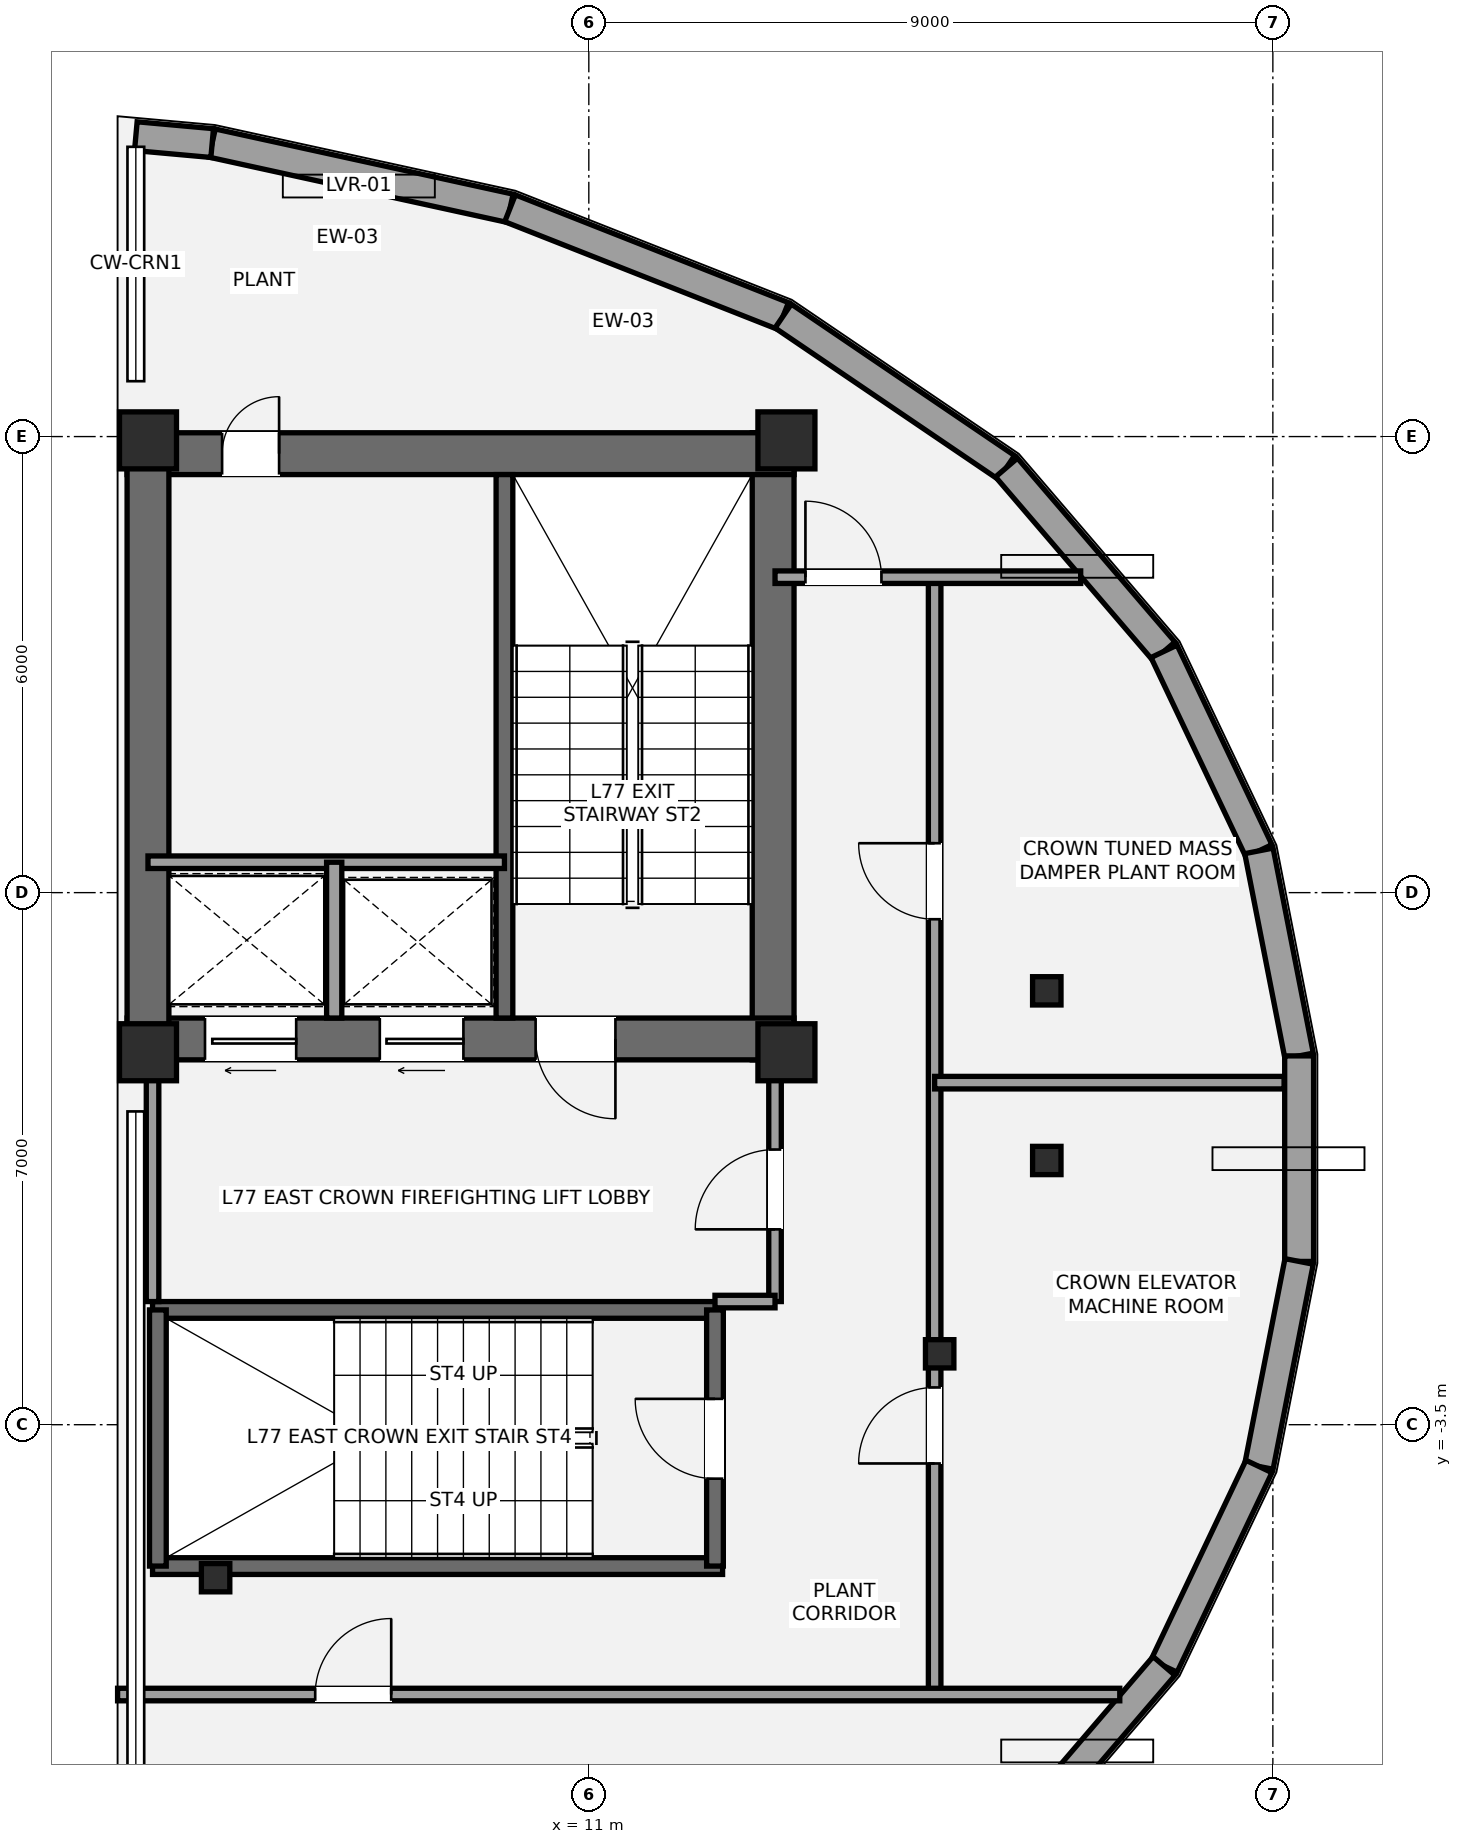
"""IFC4 building model, lengths in metres.
Left out: names, types, materials, properties, quantities, classifications, styles, units other than length and angle.
Written with IfcOpenShell. Run it as: python <this file> out.ifc"""

import sys

from ifc_helpers import new_model, si_unit, direction, frame, frame_2d, origin, origin_2d, place, context, subcontext, project, spatial, rectangle, i_section, extrude, element, fill, save


model = new_model("IFC4")
c1 = context("Model", 3, precision=1e-05, world=origin(), true_north=direction((0.0, 1.0)))
c2 = subcontext(c1, "Body", "Model", "MODEL_VIEW")
j1 = project(units=[si_unit("LENGTHUNIT", "METRE"), si_unit("PLANEANGLEUNIT", "RADIAN")], contexts=[c1])
p1 = place(None, origin())
s1 = spatial("IfcSite", under=j1, at=p1, CompositionType="ELEMENT")
p2 = place(p1, origin())
s2 = spatial("IfcBuilding", under=s1, at=p2, CompositionType="ELEMENT")
p3 = place(p2, frame((0.0, 0.0, 273.0)))
s3 = spatial("IfcBuildingStorey", under=s2, at=p3, CompositionType="ELEMENT", Elevation=273.0)
p4 = place(p3, frame((13.425, 1.3, 0.0), z_axis=(0.0, 0.0, 1.0), x_axis=(0.0, 1.0, 0.0)))
e1 = element("IfcWall", 1, at=p4, inside=s3, PredefinedType="SHEAR", context=c2, shape_type="SweptSolid", body=[
    extrude(rectangle(XDim=8.25, YDim=0.55, at=frame_2d((4.125, 0.0))), origin(), (0.0, 0.0, 1.0), 3.8),
])
p5 = place(p3, frame((4.925, 9.275, 0.0), z_axis=(0.0, 0.0, 1.0), x_axis=(1.0, 0.0, 0.0)))
e2 = element("IfcWall", 2, at=p5, inside=s3, PredefinedType="SHEAR", context=c2, shape_type="SweptSolid", body=[
    extrude(rectangle(XDim=8.775, YDim=0.55, at=frame_2d((4.387, 0.0))), origin(), (0.0, 0.0, 1.0), 3.8),
])
p6 = place(p5, frame((1.25, 0.0, 0.0)))
e3 = element("IfcOpeningElement", 3, at=p6, cuts=e2, PredefinedType="OPENING", context=c2, shape_type="SweptSolid", body=[
    extrude(rectangle(XDim=0.75, YDim=2.1, at=frame_2d((0.375, 1.05))), frame((0.0, 0.285, 0.0), z_axis=(0.0, -1.0, 0.0), x_axis=(1.0, 0.0, 0.0)), (0.0, 0.0, 1.0), 0.57),
])
p7 = place(p3, frame((13.7, 1.575, 0.0), z_axis=(0.0, 0.0, 1.0), x_axis=(-1.0, 0.0, 0.0)))
e4 = element("IfcWall", 4, at=p7, inside=s3, PredefinedType="SHEAR", context=c2, shape_type="SweptSolid", body=[
    extrude(rectangle(XDim=8.775, YDim=0.55, at=frame_2d((4.387, 0.0))), origin(), (0.0, 0.0, 1.0), 3.8),
])
p8 = place(p7, frame((2.35, 0.0, 0.0)))
e5 = element("IfcOpeningElement", 5, at=p8, cuts=e4, PredefinedType="OPENING", context=c2, shape_type="SweptSolid", body=[
    extrude(rectangle(XDim=1.05, YDim=2.15, at=frame_2d((0.525, 1.075))), frame((0.0, 0.285, 0.0), z_axis=(0.0, -1.0, 0.0), x_axis=(1.0, 0.0, 0.0)), (0.0, 0.0, 1.0), 0.57),
])
p9 = place(p7, frame((6.55, 0.0, 0.0)))
e6 = element("IfcOpeningElement", 6, at=p9, cuts=e4, PredefinedType="OPENING", context=c2, shape_type="SweptSolid", body=[
    extrude(rectangle(XDim=1.2, YDim=2.2, at=frame_2d((0.6, 1.1))), frame((0.0, 0.285, 0.0), z_axis=(0.0, -1.0, 0.0), x_axis=(1.0, 0.0, 0.0)), (0.0, 0.0, 1.0), 0.57),
])
p10 = place(p7, frame((4.35, 0.0, 0.0)))
e7 = element("IfcOpeningElement", 7, at=p10, cuts=e4, PredefinedType="OPENING", context=c2, shape_type="SweptSolid", body=[
    extrude(rectangle(XDim=1.1, YDim=2.2, at=frame_2d((0.55, 1.1))), frame((0.0, 0.285, 0.0), z_axis=(0.0, -1.0, 0.0), x_axis=(1.0, 0.0, 0.0)), (0.0, 0.0, 1.0), 0.57),
])
p11 = place(p3, frame((5.2, 1.3, 0.0), z_axis=(0.0, 0.0, 1.0), x_axis=(0.0, 1.0, 0.0)))
e8 = element("IfcWall", 8, at=p11, inside=s3, PredefinedType="SHEAR", context=c2, shape_type="SweptSolid", body=[
    extrude(rectangle(XDim=8.25, YDim=0.55, at=frame_2d((4.125, 0.0))), origin(), (0.0, 0.0, 1.0), 3.8),
])
p12 = place(p3, frame((9.89, 1.85, 0.0), z_axis=(0.0, 0.0, 1.0), x_axis=(0.0, 1.0, 0.0)))
e9 = element("IfcWall", 9, at=p12, inside=s3, PredefinedType="SHEAR", context=c2, shape_type="SweptSolid", body=[
    extrude(rectangle(XDim=7.15, YDim=0.22, at=frame_2d((3.575, 0.0))), origin(), (0.0, 0.0, 1.0), 3.8),
])
for number, where, z_axis, x_axis in (
    (10, (5.26, -1.99, 0.0), (0.0, 0.0, 1.0), (1.0, 0.0, 0.0)),
    (11, (5.26, -5.36, 0.0), (0.0, 0.0, 1.0), (1.0, 0.0, 0.0)),
):
    element("IfcWall", number, at=place(p3, frame(where, z_axis=z_axis, x_axis=x_axis)), inside=s3, PredefinedType="SHEAR", context=c2, shape_type="SweptSolid", body=[
        extrude(rectangle(XDim=7.5, YDim=0.22, at=frame_2d((3.75, 0.0))), origin(), (0.0, 0.0, 1.0), 3.8),
    ])
p13 = place(p3, frame((5.33, -5.36, 0.0), z_axis=(0.0, 0.0, 1.0), x_axis=(0.0, 1.0, 0.0)))
e12 = element("IfcWall", 12, at=p13, inside=s3, PredefinedType="SHEAR", context=c2, shape_type="SweptSolid", body=[
    extrude(rectangle(XDim=3.37, YDim=0.22, at=frame_2d((1.685, 0.0))), origin(), (0.0, 0.0, 1.0), 3.8),
])
p14 = place(p3, frame((12.66, -5.36, 0.0), z_axis=(0.0, 0.0, 1.0), x_axis=(0.0, 1.0, 0.0)))
e13 = element("IfcWall", 13, at=p14, inside=s3, PredefinedType="SHEAR", context=c2, shape_type="SweptSolid", body=[
    extrude(rectangle(XDim=3.37, YDim=0.22, at=frame_2d((1.685, 0.0))), origin(), (0.0, 0.0, 1.0), 3.8),
])
p15 = place(p14, frame((1.15, 0.0, 0.0)))
e14 = element("IfcOpeningElement", 14, at=p15, cuts=e13, PredefinedType="OPENING", context=c2, shape_type="SweptSolid", body=[
    extrude(rectangle(XDim=1.05, YDim=2.15, at=frame_2d((0.525, 1.075))), frame((0.0, 0.12, 0.0), z_axis=(0.0, -1.0, 0.0), x_axis=(1.0, 0.0, 0.0)), (0.0, 0.0, 1.0), 0.24),
])
for number, where, z_axis, x_axis in (
    (15, (5.2, 1.4, 0.0), (0.0, 0.0, 1.0), (1.0, 0.0, 0.0)),
    (16, (5.2, 9.45, 0.0), (0.0, 0.0, 1.0), (1.0, 0.0, 0.0)),
    (17, (13.6, 1.4, 0.0), (0.0, 0.0, 1.0), (1.0, 0.0, 0.0)),
    (18, (13.6, 9.45, 0.0), (0.0, 0.0, 1.0), (1.0, 0.0, 0.0)),
):
    element("IfcColumn", number, at=place(p3, frame(where, z_axis=z_axis, x_axis=x_axis)), inside=s3, PredefinedType="PILASTER", context=c2, shape_type="SweptSolid", body=[
        extrude(rectangle(XDim=0.75, YDim=0.75, at=origin_2d()), origin(), (0.0, 0.0, 1.0), 3.8),
    ])
for number, where, z_axis, x_axis in (
    (19, (17.026, 2.208, 0.0), (0.0, 0.0, 1.0), (1.0, 0.0, 0.0)),
    (20, (6.09, -5.513, 0.0), (0.0, 0.0, 1.0), (1.0, 0.0, 0.0)),
    (21, (15.616, -2.567, 0.0), (0.0, 0.0, 1.0), (1.0, 0.0, 0.0)),
    (22, (17.026, -0.024, 0.0), (0.0, 0.0, 1.0), (1.0, 0.0, 0.0)),
):
    element("IfcColumn", number, at=place(p3, frame(where, z_axis=z_axis, x_axis=x_axis)), inside=s3, PredefinedType="COLUMN", context=c2, shape_type="SweptSolid", body=[
        extrude(i_section(OverallWidth=0.374, OverallDepth=0.372, WebThickness=0.016, FlangeThickness=0.026, at=origin_2d()), origin(), (0.0, 0.0, 1.0), 3.8),
    ])
p16 = place(p3, frame((9.963, 12.504, 0.0), z_axis=(0.0, 0.0, 1.0), x_axis=(-0.97689207626, 0.213733177911, 0.0)))
e23 = element("IfcWall", 23, at=p16, inside=s3, PredefinedType="ELEMENTEDWALL", context=c2, shape_type="SweptSolid", body=[
    extrude(rectangle(XDim=4.012, YDim=0.38, at=frame_2d((2.006, 0.0))), origin(), (0.0, 0.0, 1.0), 2.97),
])
p17 = place(p3, frame((13.557, 11.086, 0.0), z_axis=(0.0, 0.0, 1.0), x_axis=(-0.930231308044, 0.366973723221, 0.0)))
e24 = element("IfcWall", 24, at=p17, inside=s3, PredefinedType="ELEMENTEDWALL", context=c2, shape_type="SweptSolid", body=[
    extrude(rectangle(XDim=3.863, YDim=0.38, at=frame_2d((1.932, 0.0))), origin(), (0.0, 0.0, 1.0), 2.97),
])
p18 = place(p3, frame((16.496, 9.093, 0.0), z_axis=(0.0, 0.0, 1.0), x_axis=(-0.827548787006, 0.561393805741, 0.0)))
e25 = element("IfcWall", 25, at=p18, inside=s3, PredefinedType="ELEMENTEDWALL", context=c2, shape_type="SweptSolid", body=[
    extrude(rectangle(XDim=3.551, YDim=0.38, at=frame_2d((1.775, 0.0))), origin(), (0.0, 0.0, 1.0), 2.97),
])
p19 = place(p3, frame((18.569, 6.675, 0.0), z_axis=(0.0, 0.0, 1.0), x_axis=(-0.650835558852, 0.759218726938, 0.0)))
e26 = element("IfcWall", 26, at=p19, inside=s3, PredefinedType="ELEMENTEDWALL", context=c2, shape_type="SweptSolid", body=[
    extrude(rectangle(XDim=3.185, YDim=0.38, at=frame_2d((1.593, 0.0))), origin(), (0.0, 0.0, 1.0), 2.97),
])
p20 = place(p3, frame((19.817, 4.049, 0.0), z_axis=(0.0, 0.0, 1.0), x_axis=(-0.429421676457, 0.903104104624, 0.0)))
e27 = element("IfcWall", 27, at=p20, inside=s3, PredefinedType="ELEMENTEDWALL", context=c2, shape_type="SweptSolid", body=[
    extrude(rectangle(XDim=2.907, YDim=0.38, at=frame_2d((1.454, 0.0))), origin(), (0.0, 0.0, 1.0), 2.97),
])
p21 = place(p3, frame((20.346, 1.352, 0.0), z_axis=(0.0, 0.0, 1.0), x_axis=(-0.192390980569, 0.981318353337, 0.0)))
e28 = element("IfcWall", 28, at=p21, inside=s3, PredefinedType="ELEMENTEDWALL", context=c2, shape_type="SweptSolid", body=[
    extrude(rectangle(XDim=2.749, YDim=0.38, at=frame_2d((1.374, 0.0))), origin(), (0.0, 0.0, 1.0), 2.97),
])
p22 = place(p3, frame((20.346, -1.352, 0.0), z_axis=(0.0, 0.0, 1.0), x_axis=(0.0, 1.0, 0.0)))
e29 = element("IfcWall", 29, at=p22, inside=s3, PredefinedType="ELEMENTEDWALL", context=c2, shape_type="SweptSolid", body=[
    extrude(rectangle(XDim=2.704, YDim=0.38, at=frame_2d((1.352, 0.0))), origin(), (0.0, 0.0, 1.0), 2.97),
])
p23 = place(p3, frame((19.817, -4.049, 0.0), z_axis=(0.0, 0.0, 1.0), x_axis=(0.192390980569, 0.981318353337, 0.0)))
e30 = element("IfcWall", 30, at=p23, inside=s3, PredefinedType="ELEMENTEDWALL", context=c2, shape_type="SweptSolid", body=[
    extrude(rectangle(XDim=2.749, YDim=0.38, at=frame_2d((1.374, 0.0))), origin(), (0.0, 0.0, 1.0), 2.97),
])
p24 = place(p3, frame((18.569, -6.675, 0.0), z_axis=(0.0, 0.0, 1.0), x_axis=(0.429421676457, 0.903104104624, 0.0)))
e31 = element("IfcWall", 31, at=p24, inside=s3, PredefinedType="ELEMENTEDWALL", context=c2, shape_type="SweptSolid", body=[
    extrude(rectangle(XDim=2.907, YDim=0.38, at=frame_2d((1.454, 0.0))), origin(), (0.0, 0.0, 1.0), 2.97),
])
p25 = place(p3, frame((16.496, -9.093, 0.0), z_axis=(0.0, 0.0, 1.0), x_axis=(0.650835558852, 0.759218726938, 0.0)))
e32 = element("IfcWall", 32, at=p25, inside=s3, PredefinedType="ELEMENTEDWALL", context=c2, shape_type="SweptSolid", body=[
    extrude(rectangle(XDim=3.185, YDim=0.38, at=frame_2d((1.593, 0.0))), origin(), (0.0, 0.0, 1.0), 2.97),
])
p26 = place(p3, frame((6.044, 13.361, 0.0), z_axis=(0.0, 0.0, 1.0), x_axis=(-0.995958429341, 0.089815405271, 0.0)))
e33 = element("IfcWall", 33, at=p26, inside=s3, PredefinedType="ELEMENTEDWALL", context=c2, shape_type="SweptSolid", body=[
    extrude(rectangle(XDim=1.009, YDim=0.38, at=frame_2d((0.504, 0.0))), origin(), (0.0, 0.0, 1.0), 2.97),
])
p27 = place(p3, frame((5.2, 3.9, 0.0), z_axis=(0.0, 0.0, 1.0), x_axis=(1.0, 0.0, 0.0)))
e34 = element("IfcWall", 34, at=p27, inside=s3, PredefinedType="PARTITIONING", context=c2, shape_type="SweptSolid", body=[
    extrude(rectangle(XDim=4.69, YDim=0.165, at=frame_2d((2.345, 0.0))), origin(), (0.0, 0.0, 1.0), 3.6),
])
p28 = place(p3, frame((7.65, 1.85, 0.0), z_axis=(0.0, 0.0, 1.0), x_axis=(0.0, 1.0, 0.0)))
e35 = element("IfcWall", 35, at=p28, inside=s3, PredefinedType="SOLIDWALL", context=c2, shape_type="SweptSolid", body=[
    extrude(rectangle(XDim=2.05, YDim=0.2, at=frame_2d((1.025, 0.0))), origin(), (0.0, 0.0, 1.0), 3.6),
])
p29 = place(p3, frame((5.26, -1.88, 0.0), z_axis=(0.0, 0.0, 1.0), x_axis=(0.0, 1.0, 0.0)))
e36 = element("IfcWall", 36, at=p29, inside=s3, PredefinedType="PARTITIONING", context=c2, shape_type="SweptSolid", body=[
    extrude(rectangle(XDim=3.23, YDim=0.165, at=frame_2d((1.615, 0.0))), origin(), (0.0, 0.0, 1.0), 3.6),
])
p30 = place(p3, frame((13.45, -1.88, 0.0), z_axis=(0.0, 0.0, 1.0), x_axis=(0.0, 1.0, 0.0)))
e37 = element("IfcWall", 37, at=p30, inside=s3, PredefinedType="PARTITIONING", context=c2, shape_type="SweptSolid", body=[
    extrude(rectangle(XDim=3.23, YDim=0.165, at=frame_2d((1.615, 0.0))), origin(), (0.0, 0.0, 1.0), 3.061),
])
p31 = place(p30, frame((0.95, 0.0, 0.0)))
e38 = element("IfcOpeningElement", 38, at=p31, cuts=e37, PredefinedType="OPENING", context=c2, shape_type="SweptSolid", body=[
    extrude(rectangle(XDim=1.05, YDim=2.15, at=frame_2d((0.525, 1.075))), frame((0.0, 0.093, 0.0), z_axis=(0.0, -1.0, 0.0), x_axis=(1.0, 0.0, 0.0)), (0.0, 0.0, 1.0), 0.185),
])
p32 = place(p3, frame((12.66, -1.88, 0.0), z_axis=(0.0, 0.0, 1.0), x_axis=(1.0, 0.0, 0.0)))
e39 = element("IfcWall", 39, at=p32, inside=s3, PredefinedType="PARTITIONING", context=c2, shape_type="SweptSolid", body=[
    extrude(rectangle(XDim=0.79, YDim=0.165, at=frame_2d((0.395, 0.0))), origin(), (0.0, 0.0, 1.0), 3.061),
])
p33 = place(p3, frame((15.55, -7.05, 0.0), z_axis=(0.0, 0.0, 1.0), x_axis=(0.0, 1.0, 0.0)))
e40 = element("IfcWall", 40, at=p33, inside=s3, PredefinedType="PARTITIONING", context=c2, shape_type="SweptSolid", body=[
    extrude(rectangle(XDim=14.7, YDim=0.165, at=frame_2d((7.35, 0.0))), origin(), (0.0, 0.0, 1.0), 2.987),
])
p34 = place(p33, frame((3.04, 0.0, 0.0)))
e41 = element("IfcOpeningElement", 41, at=p34, cuts=e40, PredefinedType="OPENING", context=c2, shape_type="SweptSolid", body=[
    extrude(rectangle(XDim=1.0, YDim=2.15, at=frame_2d((0.5, 1.075))), frame((0.0, 0.093, 0.0), z_axis=(0.0, -1.0, 0.0), x_axis=(1.0, 0.0, 0.0)), (0.0, 0.0, 1.0), 0.185),
])
p35 = place(p33, frame((10.2, 0.0, 0.0)))
e42 = element("IfcOpeningElement", 42, at=p35, cuts=e40, PredefinedType="OPENING", context=c2, shape_type="SweptSolid", body=[
    extrude(rectangle(XDim=1.0, YDim=2.15, at=frame_2d((0.5, 1.075))), frame((0.0, 0.093, 0.0), z_axis=(0.0, -1.0, 0.0), x_axis=(1.0, 0.0, 0.0)), (0.0, 0.0, 1.0), 0.185),
])
p36 = place(p3, frame((4.8, -7.05, 0.0), z_axis=(0.0, 0.0, 1.0), x_axis=(1.0, 0.0, 0.0)))
e43 = element("IfcWall", 43, at=p36, inside=s3, PredefinedType="PARTITIONING", context=c2, shape_type="SweptSolid", body=[
    extrude(rectangle(XDim=13.186, YDim=0.165, at=frame_2d((6.593, 0.0))), origin(), (0.0, 0.0, 1.0), 2.968),
])
p37 = place(p36, frame((2.6, 0.0, 0.0)))
e44 = element("IfcOpeningElement", 44, at=p37, cuts=e43, PredefinedType="OPENING", context=c2, shape_type="SweptSolid", body=[
    extrude(rectangle(XDim=1.0, YDim=2.15, at=frame_2d((0.5, 1.075))), frame((0.0, 0.093, 0.0), z_axis=(0.0, -1.0, 0.0), x_axis=(1.0, 0.0, 0.0)), (0.0, 0.0, 1.0), 0.185),
])
p38 = place(p3, frame((13.45, 7.65, 0.0), z_axis=(0.0, 0.0, 1.0), x_axis=(1.0, 0.0, 0.0)))
e45 = element("IfcWall", 45, at=p38, inside=s3, PredefinedType="PARTITIONING", context=c2, shape_type="SweptSolid", body=[
    extrude(rectangle(XDim=4.022, YDim=0.165, at=frame_2d((2.011, 0.0))), origin(), (0.0, 0.0, 1.0), 2.968),
])
p39 = place(p38, frame((0.4, 0.0, 0.0)))
e46 = element("IfcOpeningElement", 46, at=p39, cuts=e45, PredefinedType="OPENING", context=c2, shape_type="SweptSolid", body=[
    extrude(rectangle(XDim=1.0, YDim=2.15, at=frame_2d((0.5, 1.075))), frame((0.0, 0.093, 0.0), z_axis=(0.0, -1.0, 0.0), x_axis=(1.0, 0.0, 0.0)), (0.0, 0.0, 1.0), 0.185),
])
p40 = place(p3, frame((15.55, 1.0, 0.0), z_axis=(0.0, 0.0, 1.0), x_axis=(1.0, 0.0, 0.0)))
e47 = element("IfcWall", 47, at=p40, inside=s3, PredefinedType="PARTITIONING", context=c2, shape_type="SweptSolid", body=[
    extrude(rectangle(XDim=4.598, YDim=0.165, at=frame_2d((2.299, 0.0))), origin(), (0.0, 0.0, 1.0), 3.6),
])
p41 = place(p31, origin())
e48 = element("IfcDoor", 48, at=p41, inside=s3, OperationType="SINGLE_SWING_LEFT", PredefinedType="DOOR", context=c2, shape_type="SweptSolid", body=[
    extrude(rectangle(XDim=1.05, YDim=2.15, at=frame_2d((0.525, 1.075))), frame((0.0, 0.025, 0.0), z_axis=(0.0, -1.0, 0.0), x_axis=(1.0, 0.0, 0.0)), (0.0, 0.0, 1.0), 0.05),
])
fill(e38, e48)
p42 = place(p8, origin())
e49 = element("IfcDoor", 49, at=p42, inside=s3, OperationType="SINGLE_SWING_LEFT", PredefinedType="DOOR", context=c2, shape_type="SweptSolid", body=[
    extrude(rectangle(XDim=1.05, YDim=2.15, at=frame_2d((0.525, 1.075))), frame((0.0, 0.025, 0.0), z_axis=(0.0, -1.0, 0.0), x_axis=(1.0, 0.0, 0.0)), (0.0, 0.0, 1.0), 0.05),
])
fill(e5, e49)
p43 = place(p15, origin())
e50 = element("IfcDoor", 50, at=p43, inside=s3, OperationType="SINGLE_SWING_RIGHT", PredefinedType="DOOR", context=c2, shape_type="SweptSolid", body=[
    extrude(rectangle(XDim=1.05, YDim=2.15, at=frame_2d((0.525, 1.075))), frame((0.0, 0.025, 0.0), z_axis=(0.0, -1.0, 0.0), x_axis=(1.0, 0.0, 0.0)), (0.0, 0.0, 1.0), 0.05),
])
fill(e14, e50)
p44 = place(p6, origin())
e51 = element("IfcDoor", 51, at=p44, inside=s3, OperationType="SINGLE_SWING_RIGHT", PredefinedType="DOOR", context=c2, shape_type="SweptSolid", body=[
    extrude(rectangle(XDim=0.75, YDim=2.1, at=frame_2d((0.375, 1.05))), frame((0.0, 0.025, 0.0), z_axis=(0.0, -1.0, 0.0), x_axis=(1.0, 0.0, 0.0)), (0.0, 0.0, 1.0), 0.05),
])
fill(e3, e51)
p45 = place(p9, origin())
e52 = element("IfcDoor", 52, at=p45, inside=s3, OperationType="SLIDING_TO_RIGHT", PredefinedType="DOOR", context=c2, shape_type="SweptSolid", body=[
    extrude(rectangle(XDim=1.2, YDim=2.2, at=frame_2d((0.6, 1.1))), frame((0.0, 0.025, 0.0), z_axis=(0.0, -1.0, 0.0), x_axis=(1.0, 0.0, 0.0)), (0.0, 0.0, 1.0), 0.05),
])
fill(e6, e52)
p46 = place(p10, origin())
e53 = element("IfcDoor", 53, at=p46, inside=s3, OperationType="SLIDING_TO_LEFT", PredefinedType="DOOR", context=c2, shape_type="SweptSolid", body=[
    extrude(rectangle(XDim=1.1, YDim=2.2, at=frame_2d((0.55, 1.1))), frame((0.0, 0.025, 0.0), z_axis=(0.0, -1.0, 0.0), x_axis=(1.0, 0.0, 0.0)), (0.0, 0.0, 1.0), 0.05),
])
fill(e7, e53)
p47 = place(p39, origin())
e54 = element("IfcDoor", 54, at=p47, inside=s3, OperationType="SINGLE_SWING_LEFT", PredefinedType="DOOR", context=c2, shape_type="SweptSolid", body=[
    extrude(rectangle(XDim=1.0, YDim=2.15, at=frame_2d((0.5, 1.075))), frame((0.0, 0.025, 0.0), z_axis=(0.0, -1.0, 0.0), x_axis=(1.0, 0.0, 0.0)), (0.0, 0.0, 1.0), 0.05),
])
fill(e46, e54)
p48 = place(p37, origin())
e55 = element("IfcDoor", 55, at=p48, inside=s3, OperationType="SINGLE_SWING_RIGHT", PredefinedType="DOOR", context=c2, shape_type="SweptSolid", body=[
    extrude(rectangle(XDim=1.0, YDim=2.15, at=frame_2d((0.5, 1.075))), frame((0.0, 0.025, 0.0), z_axis=(0.0, -1.0, 0.0), x_axis=(1.0, 0.0, 0.0)), (0.0, 0.0, 1.0), 0.05),
])
fill(e44, e55)
p49 = place(p34, origin())
e56 = element("IfcDoor", 56, at=p49, inside=s3, OperationType="SINGLE_SWING_LEFT", PredefinedType="DOOR", context=c2, shape_type="SweptSolid", body=[
    extrude(rectangle(XDim=1.0, YDim=2.15, at=frame_2d((0.5, 1.075))), frame((0.0, 0.025, 0.0), z_axis=(0.0, -1.0, 0.0), x_axis=(1.0, 0.0, 0.0)), (0.0, 0.0, 1.0), 0.05),
])
fill(e41, e56)
p50 = place(p35, origin())
e57 = element("IfcDoor", 57, at=p50, inside=s3, OperationType="SINGLE_SWING_RIGHT", PredefinedType="DOOR", context=c2, shape_type="SweptSolid", body=[
    extrude(rectangle(XDim=1.0, YDim=2.15, at=frame_2d((0.5, 1.075))), frame((0.0, 0.025, 0.0), z_axis=(0.0, -1.0, 0.0), x_axis=(1.0, 0.0, 0.0)), (0.0, 0.0, 1.0), 0.05),
])
fill(e42, e57)
save(model, sys.argv[1])
